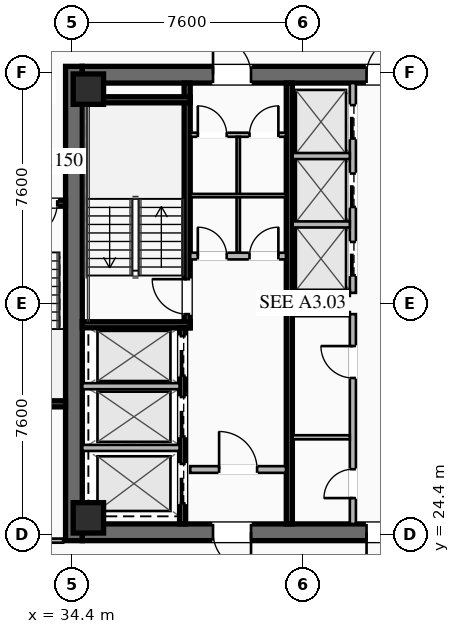
"""IFC4 building model, lengths in metres.
Left out: names, types, materials, properties, quantities, classifications, styles, units other than length and angle.
Written with IfcOpenShell. Run it as: python <this file> out.ifc"""

import sys

from ifc_helpers import new_model, si_unit, direction, frame, frame_2d, origin, origin_2d, place, context, subcontext, project, spatial, rectangle, hollow_rectangle, extrude, element, fill, save


model = new_model("IFC4")
c1 = context("Model", 3, precision=1e-05, world=origin(), true_north=direction((0.0, 1.0)))
c2 = subcontext(c1, "Body", "Model", "MODEL_VIEW")
j1 = project(units=[si_unit("LENGTHUNIT", "METRE"), si_unit("PLANEANGLEUNIT", "RADIAN")], contexts=[c1])
p1 = place(None, origin())
s1 = spatial("IfcSite", under=j1, at=p1, CompositionType="ELEMENT")
p2 = place(p1, origin())
s2 = spatial("IfcBuilding", under=s1, at=p2, CompositionType="ELEMENT")
p3 = place(p2, frame((0.0, 0.0, 160.55)))
s3 = spatial("IfcBuildingStorey", under=s2, at=p3, CompositionType="ELEMENT", Elevation=160.55)
p4 = place(p3, frame((34.475, 24.2, 0.0), z_axis=(0.0, 0.0, 1.0), x_axis=(0.0, 1.0, 0.0)))
e1 = element("IfcWall", 1, at=p4, inside=s3, PredefinedType="SHEAR", context=c2, shape_type="SweptSolid", body=[
    extrude(rectangle(XDim=15.6, YDim=0.55, at=frame_2d((7.8, 0.0))), origin(), (0.0, 0.0, 1.0), 3.55),
])
p5 = place(p3, frame((49.25, 24.475, 0.0), z_axis=(0.0, 0.0, 1.0), x_axis=(-1.0, 0.0, 0.0)))
e2 = element("IfcWall", 2, at=p5, inside=s3, PredefinedType="SHEAR", context=c2, shape_type="SweptSolid", body=[
    extrude(rectangle(XDim=14.5, YDim=0.55, at=frame_2d((7.25, 0.0))), origin(), (0.0, 0.0, 1.0), 3.55),
])
p6 = place(p5, frame((8.95, 0.0, 0.0)))
e3 = element("IfcOpeningElement", 3, at=p6, cuts=e2, PredefinedType="OPENING", context=c2, shape_type="SweptSolid", body=[
    extrude(rectangle(XDim=1.25, YDim=2.25, at=frame_2d((0.625, 1.125))), frame((0.0, 0.285, 0.0), z_axis=(0.0, -1.0, 0.0), x_axis=(1.0, 0.0, 0.0)), (0.0, 0.0, 1.0), 0.57),
])
p7 = place(p5, frame((3.9, 0.0, 0.0)))
e4 = element("IfcOpeningElement", 4, at=p7, cuts=e2, PredefinedType="OPENING", context=c2, shape_type="SweptSolid", body=[
    extrude(rectangle(XDim=1.25, YDim=2.25, at=frame_2d((0.625, 1.125))), frame((0.0, 0.285, 0.0), z_axis=(0.0, -1.0, 0.0), x_axis=(1.0, 0.0, 0.0)), (0.0, 0.0, 1.0), 0.57),
])
p8 = place(p3, frame((34.75, 39.525, 0.0), z_axis=(0.0, 0.0, 1.0), x_axis=(1.0, 0.0, 0.0)))
e5 = element("IfcWall", 5, at=p8, inside=s3, PredefinedType="SHEAR", context=c2, shape_type="SweptSolid", body=[
    extrude(rectangle(XDim=14.5, YDim=0.55, at=frame_2d((7.25, 0.0))), origin(), (0.0, 0.0, 1.0), 3.55),
])
p9 = place(p8, frame((4.3, 0.0, 0.0)))
e6 = element("IfcOpeningElement", 6, at=p9, cuts=e5, PredefinedType="OPENING", context=c2, shape_type="SweptSolid", body=[
    extrude(rectangle(XDim=1.25, YDim=2.25, at=frame_2d((0.625, 1.125))), frame((0.0, 0.285, 0.0), z_axis=(0.0, -1.0, 0.0), x_axis=(1.0, 0.0, 0.0)), (0.0, 0.0, 1.0), 0.57),
])
p10 = place(p8, frame((9.35, 0.0, 0.0)))
e7 = element("IfcOpeningElement", 7, at=p10, cuts=e5, PredefinedType="OPENING", context=c2, shape_type="SweptSolid", body=[
    extrude(rectangle(XDim=1.25, YDim=2.25, at=frame_2d((0.625, 1.125))), frame((0.0, 0.285, 0.0), z_axis=(0.0, -1.0, 0.0), x_axis=(1.0, 0.0, 0.0)), (0.0, 0.0, 1.0), 0.57),
])
for number, where, z_axis, x_axis in (
    (8, (34.95, 24.95, 0.0), (0.0, 0.0, 1.0), (1.0, 0.0, 0.0)),
    (9, (34.95, 39.05, 0.0), (0.0, 0.0, 1.0), (1.0, 0.0, 0.0)),
):
    element("IfcColumn", number, at=place(p3, frame(where, z_axis=z_axis, x_axis=x_axis)), inside=s3, PredefinedType="COLUMN", context=c2, shape_type="SweptSolid", body=[
        extrude(hollow_rectangle(XDim=1.0, YDim=1.0, WallThickness=0.04, at=origin_2d()), origin(), (0.0, 0.0, 1.0), 3.37),
    ])
p11 = place(p3, frame((38.2, 31.2, 0.0), z_axis=(0.0, 0.0, 1.0), x_axis=(0.0, 1.0, 0.0)))
e10 = element("IfcWall", 10, at=p11, inside=s3, PredefinedType="SHEAR", context=c2, shape_type="SweptSolid", body=[
    extrude(rectangle(XDim=8.05, YDim=0.2, at=frame_2d((4.025, 0.0))), origin(), (0.0, 0.0, 1.0), 3.37),
])
p12 = place(p11, frame((0.45, 0.0, 0.0)))
e11 = element("IfcOpeningElement", 11, at=p12, cuts=e10, PredefinedType="OPENING", context=c2, shape_type="SweptSolid", body=[
    extrude(rectangle(XDim=1.15, YDim=2.2, at=frame_2d((0.575, 1.1))), frame((0.0, 0.11, 0.0), z_axis=(0.0, -1.0, 0.0), x_axis=(1.0, 0.0, 0.0)), (0.0, 0.0, 1.0), 0.22),
])
for number, where, z_axis, x_axis in (
    (12, (34.75, 31.3, 0.0), (0.0, 0.0, 1.0), (1.0, 0.0, 0.0)),
    (13, (34.75, 38.7, 0.0), (0.0, 0.0, 1.0), (1.0, 0.0, 0.0)),
):
    element("IfcWall", number, at=place(p3, frame(where, z_axis=z_axis, x_axis=x_axis)), inside=s3, PredefinedType="SHEAR", context=c2, shape_type="SweptSolid", body=[
        extrude(rectangle(XDim=3.55, YDim=0.2, at=frame_2d((1.775, 0.0))), origin(), (0.0, 0.0, 1.0), 3.37),
    ])
p13 = place(p3, frame((41.56, 24.75, 0.0), z_axis=(0.0, 0.0, 1.0), x_axis=(0.0, 1.0, 0.0)))
e14 = element("IfcWall", 14, at=p13, inside=s3, PredefinedType="SHEAR", context=c2, shape_type="SweptSolid", body=[
    extrude(rectangle(XDim=14.5, YDim=0.2, at=frame_2d((7.25, 0.0))), origin(), (0.0, 0.0, 1.0), 3.37),
])
p14 = place(p3, frame((38.3, 33.56, 0.0), z_axis=(0.0, 0.0, 1.0), x_axis=(1.0, 0.0, 0.0)))
e15 = element("IfcWall", 15, at=p14, inside=s3, PredefinedType="SOLIDWALL", context=c2, shape_type="SweptSolid", body=[
    extrude(rectangle(XDim=3.15, YDim=0.22, at=frame_2d((1.575, 0.0))), origin(), (0.0, 0.0, 1.0), 2.723),
])
p15 = place(p14, frame((0.25, 0.0, 0.0)))
e16 = element("IfcOpeningElement", 16, at=p15, cuts=e15, PredefinedType="OPENING", context=c2, shape_type="SweptSolid", body=[
    extrude(rectangle(XDim=0.95, YDim=2.05, at=frame_2d((0.475, 1.025))), frame((0.0, 0.12, 0.0), z_axis=(0.0, -1.0, 0.0), x_axis=(1.0, 0.0, 0.0)), (0.0, 0.0, 1.0), 0.24),
])
p16 = place(p14, frame((1.95, 0.0, 0.0)))
e17 = element("IfcOpeningElement", 17, at=p16, cuts=e15, PredefinedType="OPENING", context=c2, shape_type="SweptSolid", body=[
    extrude(rectangle(XDim=0.95, YDim=2.05, at=frame_2d((0.475, 1.025))), frame((0.0, 0.12, 0.0), z_axis=(0.0, -1.0, 0.0), x_axis=(1.0, 0.0, 0.0)), (0.0, 0.0, 1.0), 0.24),
])
p17 = place(p3, frame((38.3, 26.54, 0.0), z_axis=(0.0, 0.0, 1.0), x_axis=(1.0, 0.0, 0.0)))
e18 = element("IfcWall", 18, at=p17, inside=s3, PredefinedType="SOLIDWALL", context=c2, shape_type="SweptSolid", body=[
    extrude(rectangle(XDim=3.15, YDim=0.22, at=frame_2d((1.575, 0.0))), origin(), (0.0, 0.0, 1.0), 2.723),
])
p18 = place(p17, frame((0.95, 0.0, 0.0)))
e19 = element("IfcOpeningElement", 19, at=p18, cuts=e18, PredefinedType="OPENING", context=c2, shape_type="SweptSolid", body=[
    extrude(rectangle(XDim=1.25, YDim=2.25, at=frame_2d((0.625, 1.125))), frame((0.0, 0.12, 0.0), z_axis=(0.0, -1.0, 0.0), x_axis=(1.0, 0.0, 0.0)), (0.0, 0.0, 1.0), 0.24),
])
p19 = place(p3, frame((38.05, 24.75, 0.0), z_axis=(0.0, 0.0, 1.0), x_axis=(0.0, 1.0, 0.0)))
e20 = element("IfcWall", 20, at=p19, inside=s3, PredefinedType="SHEAR", context=c2, shape_type="SweptSolid", body=[
    extrude(rectangle(XDim=6.45, YDim=0.2, at=frame_2d((3.225, 0.0))), origin(), (0.0, 0.0, 1.0), 3.37),
])
p20 = place(p19, frame((4.875, 0.0, 0.0)))
e21 = element("IfcOpeningElement", 21, at=p20, cuts=e20, PredefinedType="OPENING", context=c2, shape_type="SweptSolid", body=[
    extrude(rectangle(XDim=1.3, YDim=2.25, at=frame_2d((0.65, 1.125))), frame((0.0, 0.11, 0.0), z_axis=(0.0, -1.0, 0.0), x_axis=(1.0, 0.0, 0.0)), (0.0, 0.0, 1.0), 0.22),
])
p21 = place(p19, frame((2.875, 0.0, 0.0)))
e22 = element("IfcOpeningElement", 22, at=p21, cuts=e20, PredefinedType="OPENING", context=c2, shape_type="SweptSolid", body=[
    extrude(rectangle(XDim=1.3, YDim=2.25, at=frame_2d((0.65, 1.125))), frame((0.0, 0.11, 0.0), z_axis=(0.0, -1.0, 0.0), x_axis=(1.0, 0.0, 0.0)), (0.0, 0.0, 1.0), 0.22),
])
p22 = place(p19, frame((0.675, 0.0, 0.0)))
e23 = element("IfcOpeningElement", 23, at=p22, cuts=e20, PredefinedType="OPENING", context=c2, shape_type="SweptSolid", body=[
    extrude(rectangle(XDim=1.3, YDim=2.25, at=frame_2d((0.65, 1.125))), frame((0.0, 0.11, 0.0), z_axis=(0.0, -1.0, 0.0), x_axis=(1.0, 0.0, 0.0)), (0.0, 0.0, 1.0), 0.22),
])
for number, where, z_axis, x_axis in (
    (24, (34.75, 27.25, 0.0), (0.0, 0.0, 1.0), (1.0, 0.0, 0.0)),
    (25, (34.75, 29.28, 0.0), (0.0, 0.0, 1.0), (1.0, 0.0, 0.0)),
):
    element("IfcWall", number, at=place(p3, frame(where, z_axis=z_axis, x_axis=x_axis)), inside=s3, PredefinedType="SOLIDWALL", context=c2, shape_type="SweptSolid", body=[
        extrude(rectangle(XDim=3.2, YDim=0.2, at=frame_2d((1.6, 0.0))), origin(), (0.0, 0.0, 1.0), 3.37),
    ])
p23 = place(p3, frame((38.3, 37.55, 0.0), z_axis=(0.0, 0.0, 1.0), x_axis=(1.0, 0.0, 0.0)))
e26 = element("IfcWall", 26, at=p23, inside=s3, PredefinedType="PARTITIONING", context=c2, shape_type="SweptSolid", body=[
    extrude(rectangle(XDim=3.15, YDim=0.135, at=frame_2d((1.575, 0.0))), origin(), (0.0, 0.0, 1.0), 2.723),
])
p24 = place(p23, frame((0.25, 0.0, 0.0)))
e27 = element("IfcOpeningElement", 27, at=p24, cuts=e26, PredefinedType="OPENING", context=c2, shape_type="SweptSolid", body=[
    extrude(rectangle(XDim=0.95, YDim=2.05, at=frame_2d((0.475, 1.025))), frame((0.0, 0.077, 0.0), z_axis=(0.0, -1.0, 0.0), x_axis=(1.0, 0.0, 0.0)), (0.0, 0.0, 1.0), 0.155),
])
p25 = place(p23, frame((1.95, 0.0, 0.0)))
e28 = element("IfcOpeningElement", 28, at=p25, cuts=e26, PredefinedType="OPENING", context=c2, shape_type="SweptSolid", body=[
    extrude(rectangle(XDim=0.95, YDim=2.05, at=frame_2d((0.475, 1.025))), frame((0.0, 0.077, 0.0), z_axis=(0.0, -1.0, 0.0), x_axis=(1.0, 0.0, 0.0)), (0.0, 0.0, 1.0), 0.155),
])
p26 = place(p3, frame((39.88, 33.68, 0.0), z_axis=(0.0, 0.0, 1.0), x_axis=(0.0, 1.0, 0.0)))
e29 = element("IfcWall", 29, at=p26, inside=s3, PredefinedType="PARTITIONING", context=c2, shape_type="SweptSolid", body=[
    extrude(rectangle(XDim=3.8, YDim=0.11, at=frame_2d((1.9, 0.0))), origin(), (0.0, 0.0, 1.0), 2.723),
])
p27 = place(p3, frame((38.3, 35.55, 0.0), z_axis=(0.0, 0.0, 1.0), x_axis=(1.0, 0.0, 0.0)))
e30 = element("IfcWall", 30, at=p27, inside=s3, PredefinedType="PARTITIONING", context=c2, shape_type="SweptSolid", body=[
    extrude(rectangle(XDim=3.15, YDim=0.11, at=frame_2d((1.575, 0.0))), origin(), (0.0, 0.0, 1.0), 2.723),
])
p28 = place(p3, frame((43.65, 24.75, 0.0), z_axis=(0.0, 0.0, 1.0), x_axis=(0.0, 1.0, 0.0)))
e31 = element("IfcWall", 31, at=p28, inside=s3, PredefinedType="SOLIDWALL", context=c2, shape_type="SweptSolid", body=[
    extrude(rectangle(XDim=6.9, YDim=0.2, at=frame_2d((3.45, 0.0))), origin(), (0.0, 0.0, 1.0), 2.723),
])
p29 = place(p28, frame((0.85, 0.0, 0.0)))
e32 = element("IfcOpeningElement", 32, at=p29, cuts=e31, PredefinedType="OPENING", context=c2, shape_type="SweptSolid", body=[
    extrude(rectangle(XDim=0.95, YDim=2.05, at=frame_2d((0.475, 1.025))), frame((0.0, 0.11, 0.0), z_axis=(0.0, -1.0, 0.0), x_axis=(1.0, 0.0, 0.0)), (0.0, 0.0, 1.0), 0.22),
])
p30 = place(p28, frame((4.8, 0.0, 0.0)))
e33 = element("IfcOpeningElement", 33, at=p30, cuts=e31, PredefinedType="OPENING", context=c2, shape_type="SweptSolid", body=[
    extrude(rectangle(XDim=1.05, YDim=2.2, at=frame_2d((0.525, 1.1))), frame((0.0, 0.11, 0.0), z_axis=(0.0, -1.0, 0.0), x_axis=(1.0, 0.0, 0.0)), (0.0, 0.0, 1.0), 0.22),
])
for number, where, z_axis, x_axis in (
    (34, (41.67, 31.65, 0.0), (0.0, 0.0, 1.0), (1.0, 0.0, 0.0)),
    (35, (41.67, 27.6, 0.0), (0.0, 0.0, 1.0), (1.0, 0.0, 0.0)),
):
    element("IfcWall", number, at=place(p3, frame(where, z_axis=z_axis, x_axis=x_axis)), inside=s3, PredefinedType="PARTITIONING", context=c2, shape_type="SweptSolid", body=[
        extrude(rectangle(XDim=1.88, YDim=0.135, at=frame_2d((0.94, 0.0))), origin(), (0.0, 0.0, 1.0), 2.723),
    ])
p31 = place(p3, frame((43.65, 32.35, 0.0), z_axis=(0.0, 0.0, 1.0), x_axis=(0.0, 1.0, 0.0)))
e36 = element("IfcWall", 36, at=p31, inside=s3, PredefinedType="SOLIDWALL", context=c2, shape_type="SweptSolid", body=[
    extrude(rectangle(XDim=6.9, YDim=0.2, at=frame_2d((3.45, 0.0))), origin(), (0.0, 0.0, 1.0), 3.37),
])
p32 = place(p31, frame((0.575, 0.0, 0.0)))
e37 = element("IfcOpeningElement", 37, at=p32, cuts=e36, PredefinedType="OPENING", context=c2, shape_type="SweptSolid", body=[
    extrude(rectangle(XDim=1.1, YDim=2.2, at=frame_2d((0.55, 1.1))), frame((0.0, 0.11, 0.0), z_axis=(0.0, -1.0, 0.0), x_axis=(1.0, 0.0, 0.0)), (0.0, 0.0, 1.0), 0.22),
])
p33 = place(p31, frame((2.825, 0.0, 0.0)))
e38 = element("IfcOpeningElement", 38, at=p33, cuts=e36, PredefinedType="OPENING", context=c2, shape_type="SweptSolid", body=[
    extrude(rectangle(XDim=1.1, YDim=2.2, at=frame_2d((0.55, 1.1))), frame((0.0, 0.11, 0.0), z_axis=(0.0, -1.0, 0.0), x_axis=(1.0, 0.0, 0.0)), (0.0, 0.0, 1.0), 0.22),
])
p34 = place(p31, frame((5.075, 0.0, 0.0)))
e39 = element("IfcOpeningElement", 39, at=p34, cuts=e36, PredefinedType="OPENING", context=c2, shape_type="SweptSolid", body=[
    extrude(rectangle(XDim=1.1, YDim=2.2, at=frame_2d((0.55, 1.1))), frame((0.0, 0.11, 0.0), z_axis=(0.0, -1.0, 0.0), x_axis=(1.0, 0.0, 0.0)), (0.0, 0.0, 1.0), 0.22),
])
for number, where, z_axis, x_axis in (
    (40, (41.67, 32.35, 0.0), (0.0, 0.0, 1.0), (1.0, 0.0, 0.0)),
    (41, (41.67, 34.6, 0.0), (0.0, 0.0, 1.0), (1.0, 0.0, 0.0)),
    (42, (41.67, 36.85, 0.0), (0.0, 0.0, 1.0), (1.0, 0.0, 0.0)),
):
    element("IfcWall", number, at=place(p3, frame(where, z_axis=z_axis, x_axis=x_axis)), inside=s3, PredefinedType="SOLIDWALL", context=c2, shape_type="SweptSolid", body=[
        extrude(rectangle(XDim=1.88, YDim=0.2, at=frame_2d((0.94, 0.0))), origin(), (0.0, 0.0, 1.0), 3.37),
    ])
p35 = place(p3, frame((34.2, 35.3, 0.0), z_axis=(0.0, 0.0, 1.0), x_axis=(-1.0, 0.0, 0.0)))
e43 = element("IfcWall", 43, at=p35, inside=s3, PredefinedType="SHEAR", context=c2, shape_type="SweptSolid", body=[
    extrude(rectangle(XDim=3.4, YDim=0.2, at=frame_2d((1.7, 0.0))), origin(), (0.0, 0.0, 1.0), 3.37),
])
p36 = place(p35, frame((0.275, 0.0, 0.0)))
e44 = element("IfcOpeningElement", 44, at=p36, cuts=e43, PredefinedType="OPENING", context=c2, shape_type="SweptSolid", body=[
    extrude(rectangle(XDim=1.15, YDim=2.2, at=frame_2d((0.575, 1.1))), frame((0.0, 0.11, 0.0), z_axis=(0.0, -1.0, 0.0), x_axis=(1.0, 0.0, 0.0)), (0.0, 0.0, 1.0), 0.22),
])
p37 = place(p3, frame((30.8, 28.7, 0.0), z_axis=(0.0, 0.0, 1.0), x_axis=(1.0, 0.0, 0.0)))
e45 = element("IfcWall", 45, at=p37, inside=s3, PredefinedType="SHEAR", context=c2, shape_type="SweptSolid", body=[
    extrude(rectangle(XDim=3.4, YDim=0.2, at=frame_2d((1.7, 0.0))), origin(), (0.0, 0.0, 1.0), 3.37),
])
p38 = place(p3, frame((24.32, 24.2, 0.0), z_axis=(0.0, 0.0, 1.0), x_axis=(1.0, 0.0, 0.0)))
e46 = element("IfcWall", 46, at=p38, inside=s3, PredefinedType="PARTITIONING", context=c2, shape_type="SweptSolid", body=[
    extrude(rectangle(XDim=9.8, YDim=0.135, at=frame_2d((4.9, 0.0))), origin(), (0.0, 0.0, 1.0), 2.723),
])
p39 = place(p38, frame((6.805, 0.0, 0.0)))
e47 = element("IfcOpeningElement", 47, at=p39, cuts=e46, PredefinedType="OPENING", context=c2, shape_type="SweptSolid", body=[
    extrude(rectangle(XDim=0.95, YDim=2.05, at=frame_2d((0.475, 1.025))), frame((0.0, 0.077, 0.0), z_axis=(0.0, -1.0, 0.0), x_axis=(1.0, 0.0, 0.0)), (0.0, 0.0, 1.0), 0.155),
])
p40 = place(p9, origin())
e48 = element("IfcDoor", 48, at=p40, inside=s3, OperationType="SINGLE_SWING_LEFT", PredefinedType="DOOR", context=c2, shape_type="SweptSolid", body=[
    extrude(rectangle(XDim=1.25, YDim=2.25, at=frame_2d((0.625, 1.125))), frame((0.0, 0.025, 0.0), z_axis=(0.0, -1.0, 0.0), x_axis=(1.0, 0.0, 0.0)), (0.0, 0.0, 1.0), 0.05),
])
fill(e6, e48)
p41 = place(p10, origin())
e49 = element("IfcDoor", 49, at=p41, inside=s3, OperationType="SINGLE_SWING_RIGHT", PredefinedType="DOOR", context=c2, shape_type="SweptSolid", body=[
    extrude(rectangle(XDim=1.25, YDim=2.25, at=frame_2d((0.625, 1.125))), frame((0.0, 0.025, 0.0), z_axis=(0.0, -1.0, 0.0), x_axis=(1.0, 0.0, 0.0)), (0.0, 0.0, 1.0), 0.05),
])
fill(e7, e49)
p42 = place(p6, origin())
e50 = element("IfcDoor", 50, at=p42, inside=s3, OperationType="SINGLE_SWING_LEFT", PredefinedType="DOOR", context=c2, shape_type="SweptSolid", body=[
    extrude(rectangle(XDim=1.25, YDim=2.25, at=frame_2d((0.625, 1.125))), frame((0.0, 0.025, 0.0), z_axis=(0.0, -1.0, 0.0), x_axis=(1.0, 0.0, 0.0)), (0.0, 0.0, 1.0), 0.05),
])
fill(e3, e50)
p43 = place(p7, origin())
e51 = element("IfcDoor", 51, at=p43, inside=s3, OperationType="SINGLE_SWING_RIGHT", PredefinedType="DOOR", context=c2, shape_type="SweptSolid", body=[
    extrude(rectangle(XDim=1.25, YDim=2.25, at=frame_2d((0.625, 1.125))), frame((0.0, 0.025, 0.0), z_axis=(0.0, -1.0, 0.0), x_axis=(1.0, 0.0, 0.0)), (0.0, 0.0, 1.0), 0.05),
])
fill(e4, e51)
p44 = place(p12, origin())
e52 = element("IfcDoor", 52, at=p44, inside=s3, OperationType="SINGLE_SWING_RIGHT", PredefinedType="DOOR", context=c2, shape_type="SweptSolid", body=[
    extrude(rectangle(XDim=1.15, YDim=2.2, at=frame_2d((0.575, 1.1))), frame((0.0, 0.025, 0.0), z_axis=(0.0, -1.0, 0.0), x_axis=(1.0, 0.0, 0.0)), (0.0, 0.0, 1.0), 0.05),
])
fill(e11, e52)
p45 = place(p18, origin())
e53 = element("IfcDoor", 53, at=p45, inside=s3, OperationType="SINGLE_SWING_LEFT", PredefinedType="DOOR", context=c2, shape_type="SweptSolid", body=[
    extrude(rectangle(XDim=1.25, YDim=2.25, at=frame_2d((0.625, 1.125))), frame((0.0, 0.025, 0.0), z_axis=(0.0, -1.0, 0.0), x_axis=(1.0, 0.0, 0.0)), (0.0, 0.0, 1.0), 0.05),
])
fill(e19, e53)
p46 = place(p24, origin())
e54 = element("IfcDoor", 54, at=p46, inside=s3, OperationType="SINGLE_SWING_LEFT", PredefinedType="DOOR", context=c2, shape_type="SweptSolid", body=[
    extrude(rectangle(XDim=0.95, YDim=2.05, at=frame_2d((0.475, 1.025))), frame((0.0, 0.025, 0.0), z_axis=(0.0, -1.0, 0.0), x_axis=(1.0, 0.0, 0.0)), (0.0, 0.0, 1.0), 0.05),
])
fill(e27, e54)
p47 = place(p25, origin())
e55 = element("IfcDoor", 55, at=p47, inside=s3, OperationType="SINGLE_SWING_RIGHT", PredefinedType="DOOR", context=c2, shape_type="SweptSolid", body=[
    extrude(rectangle(XDim=0.95, YDim=2.05, at=frame_2d((0.475, 1.025))), frame((0.0, 0.025, 0.0), z_axis=(0.0, -1.0, 0.0), x_axis=(1.0, 0.0, 0.0)), (0.0, 0.0, 1.0), 0.05),
])
fill(e28, e55)
p48 = place(p15, origin())
e56 = element("IfcDoor", 56, at=p48, inside=s3, OperationType="SINGLE_SWING_LEFT", PredefinedType="DOOR", context=c2, shape_type="SweptSolid", body=[
    extrude(rectangle(XDim=0.95, YDim=2.05, at=frame_2d((0.475, 1.025))), frame((0.0, 0.025, 0.0), z_axis=(0.0, -1.0, 0.0), x_axis=(1.0, 0.0, 0.0)), (0.0, 0.0, 1.0), 0.05),
])
fill(e16, e56)
p49 = place(p16, origin())
e57 = element("IfcDoor", 57, at=p49, inside=s3, OperationType="SINGLE_SWING_RIGHT", PredefinedType="DOOR", context=c2, shape_type="SweptSolid", body=[
    extrude(rectangle(XDim=0.95, YDim=2.05, at=frame_2d((0.475, 1.025))), frame((0.0, 0.025, 0.0), z_axis=(0.0, -1.0, 0.0), x_axis=(1.0, 0.0, 0.0)), (0.0, 0.0, 1.0), 0.05),
])
fill(e17, e57)
p50 = place(p29, origin())
e58 = element("IfcDoor", 58, at=p50, inside=s3, OperationType="SINGLE_SWING_LEFT", PredefinedType="DOOR", context=c2, shape_type="SweptSolid", body=[
    extrude(rectangle(XDim=0.95, YDim=2.05, at=frame_2d((0.475, 1.025))), frame((0.0, 0.025, 0.0), z_axis=(0.0, -1.0, 0.0), x_axis=(1.0, 0.0, 0.0)), (0.0, 0.0, 1.0), 0.05),
])
fill(e32, e58)
p51 = place(p30, origin())
e59 = element("IfcDoor", 59, at=p51, inside=s3, OperationType="SINGLE_SWING_RIGHT", PredefinedType="DOOR", context=c2, shape_type="SweptSolid", body=[
    extrude(rectangle(XDim=1.05, YDim=2.2, at=frame_2d((0.525, 1.1))), frame((0.0, 0.025, 0.0), z_axis=(0.0, -1.0, 0.0), x_axis=(1.0, 0.0, 0.0)), (0.0, 0.0, 1.0), 0.05),
])
fill(e33, e59)
p52 = place(p36, origin())
e60 = element("IfcDoor", 60, at=p52, inside=s3, OperationType="SINGLE_SWING_RIGHT", PredefinedType="DOOR", context=c2, shape_type="SweptSolid", body=[
    extrude(rectangle(XDim=1.15, YDim=2.2, at=frame_2d((0.575, 1.1))), frame((0.0, 0.025, 0.0), z_axis=(0.0, -1.0, 0.0), x_axis=(1.0, 0.0, 0.0)), (0.0, 0.0, 1.0), 0.05),
])
fill(e44, e60)
p53 = place(p20, origin())
e61 = element("IfcDoor", 61, at=p53, inside=s3, OperationType="SLIDING_TO_LEFT", PredefinedType="DOOR", context=c2, shape_type="SweptSolid", body=[
    extrude(rectangle(XDim=1.3, YDim=2.25, at=frame_2d((0.65, 1.125))), frame((0.0, 0.025, 0.0), z_axis=(0.0, -1.0, 0.0), x_axis=(1.0, 0.0, 0.0)), (0.0, 0.0, 1.0), 0.05),
])
fill(e21, e61)
p54 = place(p21, origin())
e62 = element("IfcDoor", 62, at=p54, inside=s3, OperationType="SLIDING_TO_LEFT", PredefinedType="DOOR", context=c2, shape_type="SweptSolid", body=[
    extrude(rectangle(XDim=1.3, YDim=2.25, at=frame_2d((0.65, 1.125))), frame((0.0, 0.025, 0.0), z_axis=(0.0, -1.0, 0.0), x_axis=(1.0, 0.0, 0.0)), (0.0, 0.0, 1.0), 0.05),
])
fill(e22, e62)
p55 = place(p22, origin())
e63 = element("IfcDoor", 63, at=p55, inside=s3, OperationType="SLIDING_TO_LEFT", PredefinedType="DOOR", context=c2, shape_type="SweptSolid", body=[
    extrude(rectangle(XDim=1.3, YDim=2.25, at=frame_2d((0.65, 1.125))), frame((0.0, 0.025, 0.0), z_axis=(0.0, -1.0, 0.0), x_axis=(1.0, 0.0, 0.0)), (0.0, 0.0, 1.0), 0.05),
])
fill(e23, e63)
p56 = place(p32, origin())
e64 = element("IfcDoor", 64, at=p56, inside=s3, OperationType="SLIDING_TO_LEFT", PredefinedType="DOOR", context=c2, shape_type="SweptSolid", body=[
    extrude(rectangle(XDim=1.1, YDim=2.2, at=frame_2d((0.55, 1.1))), frame((0.0, 0.025, 0.0), z_axis=(0.0, -1.0, 0.0), x_axis=(1.0, 0.0, 0.0)), (0.0, 0.0, 1.0), 0.05),
])
fill(e37, e64)
p57 = place(p33, origin())
e65 = element("IfcDoor", 65, at=p57, inside=s3, OperationType="SLIDING_TO_LEFT", PredefinedType="DOOR", context=c2, shape_type="SweptSolid", body=[
    extrude(rectangle(XDim=1.1, YDim=2.2, at=frame_2d((0.55, 1.1))), frame((0.0, 0.025, 0.0), z_axis=(0.0, -1.0, 0.0), x_axis=(1.0, 0.0, 0.0)), (0.0, 0.0, 1.0), 0.05),
])
fill(e38, e65)
p58 = place(p34, origin())
e66 = element("IfcDoor", 66, at=p58, inside=s3, OperationType="SLIDING_TO_LEFT", PredefinedType="DOOR", context=c2, shape_type="SweptSolid", body=[
    extrude(rectangle(XDim=1.1, YDim=2.2, at=frame_2d((0.55, 1.1))), frame((0.0, 0.025, 0.0), z_axis=(0.0, -1.0, 0.0), x_axis=(1.0, 0.0, 0.0)), (0.0, 0.0, 1.0), 0.05),
])
fill(e39, e66)
save(model, sys.argv[1])
